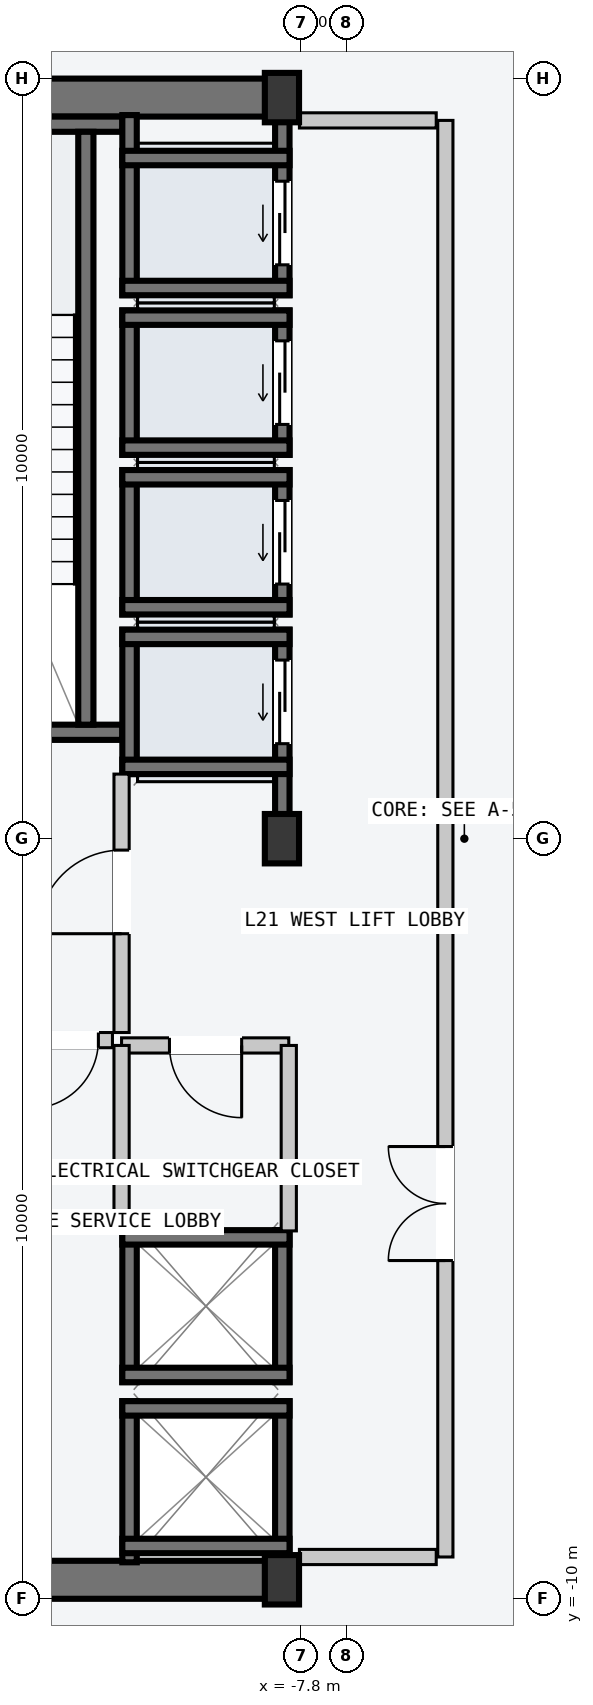
"""IFC4 building model, lengths in metres.
Left out: names, types, materials, properties, quantities, classifications, styles, units other than length and angle.
Written with IfcOpenShell. Run it as: python <this file> out.ifc"""

import sys

from ifc_helpers import new_model, si_unit, direction, frame, frame_2d, origin, origin_2d, place, context, subcontext, project, spatial, rectangle, i_section, extrude, element, fill, save


model = new_model("IFC4")
c1 = context("Model", 3, precision=1e-05, world=origin(), true_north=direction((0.0, 1.0)))
c2 = subcontext(c1, "Body", "Model", "MODEL_VIEW")
j1 = project(units=[si_unit("LENGTHUNIT", "METRE"), si_unit("PLANEANGLEUNIT", "RADIAN")], contexts=[c1])
p1 = place(None, origin())
s1 = spatial("IfcSite", under=j1, at=p1, CompositionType="ELEMENT")
p2 = place(p1, origin())
s2 = spatial("IfcBuilding", under=s1, at=p2, CompositionType="ELEMENT")
p3 = place(p2, frame((0.0, 0.0, 82.8)))
s3 = spatial("IfcBuildingStorey", under=s2, at=p3, CompositionType="ELEMENT", Elevation=82.8)
for number, where, z_axis, x_axis in (
    (1, (-14.53, -9.75, -0.2), (0.0, 0.0, 1.0), (1.0, 0.0, 0.0)),
    (2, (-14.53, 9.75, -0.2), (0.0, 0.0, 1.0), (1.0, 0.0, 0.0)),
):
    element("IfcWall", number, at=place(p3, frame(where, z_axis=z_axis, x_axis=x_axis)), inside=s3, PredefinedType="SHEAR", context=c2, shape_type="SweptSolid", body=[
        extrude(rectangle(XDim=6.46, YDim=0.5, at=frame_2d((3.23, 0.0))), origin(), (0.0, 0.0, 1.0), 4.5),
    ])
p4 = place(p3, frame((-14.25, 1.4, -0.2), z_axis=(0.0, 0.0, 1.0), x_axis=(1.0, 0.0, 0.0)))
e3 = element("IfcWall", 3, at=p4, inside=s3, PredefinedType="SOLIDWALL", context=c2, shape_type="SweptSolid", body=[
    extrude(rectangle(XDim=4.1, YDim=0.2, at=frame_2d((2.05, 0.0))), origin(), (0.0, 0.0, 1.0), 4.5),
])
p5 = place(p4, frame((1.5, 0.0, 0.2)))
e4 = element("IfcOpeningElement", 4, at=p5, cuts=e3, PredefinedType="OPENING", context=c2, shape_type="SweptSolid", body=[
    extrude(rectangle(XDim=1.12, YDim=2.18, at=frame_2d((0.56, 1.09))), frame((0.0, 0.11, 0.0), z_axis=(0.0, -1.0, 0.0), x_axis=(1.0, 0.0, 0.0)), (0.0, 0.0, 1.0), 0.22),
])
p6 = place(p3, frame((-14.25, 9.4, -0.2), z_axis=(0.0, 0.0, 1.0), x_axis=(1.0, 0.0, 0.0)))
e5 = element("IfcWall", 5, at=p6, inside=s3, PredefinedType="SOLIDWALL", context=c2, shape_type="SweptSolid", body=[
    extrude(rectangle(XDim=4.1, YDim=0.2, at=frame_2d((2.05, 0.0))), origin(), (0.0, 0.0, 1.0), 4.5),
])
p7 = place(p3, frame((-10.63, 1.5, -0.2), z_axis=(0.0, 0.0, 1.0), x_axis=(0.0, 1.0, 0.0)))
e6 = element("IfcWall", 6, at=p7, inside=s3, PredefinedType="SOLIDWALL", context=c2, shape_type="SweptSolid", body=[
    extrude(rectangle(XDim=7.8, YDim=0.2, at=frame_2d((3.9, 0.0))), origin(), (0.0, 0.0, 1.0), 4.5),
])
for number, where, z_axis, x_axis in (
    (7, (-8.05, -9.75, 0.0), (0.0, 0.0, 1.0), (1.0, 0.0, 0.0)),
    (8, (-8.05, 0.0, 0.0), (0.0, 0.0, 1.0), (1.0, 0.0, 0.0)),
    (9, (-8.05, 9.75, 0.0), (0.0, 0.0, 1.0), (1.0, 0.0, 0.0)),
):
    element("IfcColumn", number, at=place(p3, frame(where, z_axis=z_axis, x_axis=x_axis)), inside=s3, PredefinedType="COLUMN", context=c2, shape_type="SweptSolid", body=[
        extrude(i_section(OverallWidth=0.45, OverallDepth=0.65, WebThickness=0.025, FlangeThickness=0.04, at=origin_2d()), origin(), (0.0, 0.0, 1.0), 4.5),
    ])
p8 = place(p3, frame((-8.045, 0.21, -0.2), z_axis=(0.0, 0.0, 1.0), x_axis=(0.0, 1.0, 0.0)))
e10 = element("IfcWall", 10, at=p8, inside=s3, PredefinedType="SOLIDWALL", context=c2, shape_type="SweptSolid", body=[
    extrude(rectangle(XDim=2.54, YDim=0.19, at=frame_2d((1.27, 0.0))), origin(), (0.0, 0.0, 1.0), 4.5),
])
p9 = place(p8, frame((1.04, 0.0, 0.2)))
e11 = element("IfcOpeningElement", 11, at=p9, cuts=e10, PredefinedType="OPENING", context=c2, shape_type="SweptSolid", body=[
    extrude(rectangle(XDim=1.1, YDim=2.2, at=frame_2d((0.55, 1.1))), frame((0.0, 0.105, 0.0), z_axis=(0.0, -1.0, 0.0), x_axis=(1.0, 0.0, 0.0)), (0.0, 0.0, 1.0), 0.21),
])
p10 = place(p3, frame((-10.055, 0.85, -0.2), z_axis=(0.0, 0.0, 1.0), x_axis=(0.0, 1.0, 0.0)))
e12 = element("IfcWall", 12, at=p10, inside=s3, PredefinedType="SOLIDWALL", context=c2, shape_type="SweptSolid", body=[
    extrude(rectangle(XDim=1.9, YDim=0.19, at=frame_2d((0.95, 0.0))), origin(), (0.0, 0.0, 1.0), 4.5),
])
for number, where, z_axis, x_axis in (
    (13, (-10.15, 2.655, -0.2), (0.0, 0.0, 1.0), (1.0, 0.0, 0.0)),
    (14, (-10.15, 0.945, -0.2), (0.0, 0.0, 1.0), (1.0, 0.0, 0.0)),
):
    element("IfcWall", number, at=place(p3, frame(where, z_axis=z_axis, x_axis=x_axis)), inside=s3, PredefinedType="SOLIDWALL", context=c2, shape_type="SweptSolid", body=[
        extrude(rectangle(XDim=2.2, YDim=0.19, at=frame_2d((1.1, 0.0))), origin(), (0.0, 0.0, 1.0), 4.5),
    ])
p11 = place(p3, frame((-8.045, 2.95, -0.2), z_axis=(0.0, 0.0, 1.0), x_axis=(0.0, 1.0, 0.0)))
e15 = element("IfcWall", 15, at=p11, inside=s3, PredefinedType="SOLIDWALL", context=c2, shape_type="SweptSolid", body=[
    extrude(rectangle(XDim=1.9, YDim=0.19, at=frame_2d((0.95, 0.0))), origin(), (0.0, 0.0, 1.0), 4.5),
])
p12 = place(p11, frame((0.4, 0.0, 0.2)))
e16 = element("IfcOpeningElement", 16, at=p12, cuts=e15, PredefinedType="OPENING", context=c2, shape_type="SweptSolid", body=[
    extrude(rectangle(XDim=1.1, YDim=2.2, at=frame_2d((0.55, 1.1))), frame((0.0, 0.105, 0.0), z_axis=(0.0, -1.0, 0.0), x_axis=(1.0, 0.0, 0.0)), (0.0, 0.0, 1.0), 0.21),
])
p13 = place(p3, frame((-10.055, 2.95, -0.2), z_axis=(0.0, 0.0, 1.0), x_axis=(0.0, 1.0, 0.0)))
e17 = element("IfcWall", 17, at=p13, inside=s3, PredefinedType="SOLIDWALL", context=c2, shape_type="SweptSolid", body=[
    extrude(rectangle(XDim=1.9, YDim=0.19, at=frame_2d((0.95, 0.0))), origin(), (0.0, 0.0, 1.0), 4.5),
])
for number, where, z_axis, x_axis in (
    (18, (-10.15, 4.755, -0.2), (0.0, 0.0, 1.0), (1.0, 0.0, 0.0)),
    (19, (-10.15, 3.045, -0.2), (0.0, 0.0, 1.0), (1.0, 0.0, 0.0)),
):
    element("IfcWall", number, at=place(p3, frame(where, z_axis=z_axis, x_axis=x_axis)), inside=s3, PredefinedType="SOLIDWALL", context=c2, shape_type="SweptSolid", body=[
        extrude(rectangle(XDim=2.2, YDim=0.19, at=frame_2d((1.1, 0.0))), origin(), (0.0, 0.0, 1.0), 4.5),
    ])
p14 = place(p3, frame((-8.045, 5.05, -0.2), z_axis=(0.0, 0.0, 1.0), x_axis=(0.0, 1.0, 0.0)))
e20 = element("IfcWall", 20, at=p14, inside=s3, PredefinedType="SOLIDWALL", context=c2, shape_type="SweptSolid", body=[
    extrude(rectangle(XDim=1.9, YDim=0.19, at=frame_2d((0.95, 0.0))), origin(), (0.0, 0.0, 1.0), 4.5),
])
p15 = place(p14, frame((0.4, 0.0, 0.2)))
e21 = element("IfcOpeningElement", 21, at=p15, cuts=e20, PredefinedType="OPENING", context=c2, shape_type="SweptSolid", body=[
    extrude(rectangle(XDim=1.1, YDim=2.2, at=frame_2d((0.55, 1.1))), frame((0.0, 0.105, 0.0), z_axis=(0.0, -1.0, 0.0), x_axis=(1.0, 0.0, 0.0)), (0.0, 0.0, 1.0), 0.21),
])
p16 = place(p3, frame((-10.055, 5.05, -0.2), z_axis=(0.0, 0.0, 1.0), x_axis=(0.0, 1.0, 0.0)))
e22 = element("IfcWall", 22, at=p16, inside=s3, PredefinedType="SOLIDWALL", context=c2, shape_type="SweptSolid", body=[
    extrude(rectangle(XDim=1.9, YDim=0.19, at=frame_2d((0.95, 0.0))), origin(), (0.0, 0.0, 1.0), 4.5),
])
for number, where, z_axis, x_axis in (
    (23, (-10.15, 6.855, -0.2), (0.0, 0.0, 1.0), (1.0, 0.0, 0.0)),
    (24, (-10.15, 5.145, -0.2), (0.0, 0.0, 1.0), (1.0, 0.0, 0.0)),
):
    element("IfcWall", number, at=place(p3, frame(where, z_axis=z_axis, x_axis=x_axis)), inside=s3, PredefinedType="SOLIDWALL", context=c2, shape_type="SweptSolid", body=[
        extrude(rectangle(XDim=2.2, YDim=0.19, at=frame_2d((1.1, 0.0))), origin(), (0.0, 0.0, 1.0), 4.5),
    ])
p17 = place(p3, frame((-8.045, 7.15, -0.2), z_axis=(0.0, 0.0, 1.0), x_axis=(0.0, 1.0, 0.0)))
e25 = element("IfcWall", 25, at=p17, inside=s3, PredefinedType="SOLIDWALL", context=c2, shape_type="SweptSolid", body=[
    extrude(rectangle(XDim=2.37, YDim=0.19, at=frame_2d((1.185, 0.0))), origin(), (0.0, 0.0, 1.0), 4.5),
])
p18 = place(p17, frame((0.4, 0.0, 0.2)))
e26 = element("IfcOpeningElement", 26, at=p18, cuts=e25, PredefinedType="OPENING", context=c2, shape_type="SweptSolid", body=[
    extrude(rectangle(XDim=1.1, YDim=2.2, at=frame_2d((0.55, 1.1))), frame((0.0, 0.105, 0.0), z_axis=(0.0, -1.0, 0.0), x_axis=(1.0, 0.0, 0.0)), (0.0, 0.0, 1.0), 0.21),
])
p19 = place(p3, frame((-10.055, 7.15, -0.2), z_axis=(0.0, 0.0, 1.0), x_axis=(0.0, 1.0, 0.0)))
e27 = element("IfcWall", 27, at=p19, inside=s3, PredefinedType="SOLIDWALL", context=c2, shape_type="SweptSolid", body=[
    extrude(rectangle(XDim=2.37, YDim=0.19, at=frame_2d((1.185, 0.0))), origin(), (0.0, 0.0, 1.0), 4.5),
])
for number, where, z_axis, x_axis in (
    (28, (-10.15, 8.955, -0.2), (0.0, 0.0, 1.0), (1.0, 0.0, 0.0)),
    (29, (-10.15, 7.245, -0.2), (0.0, 0.0, 1.0), (1.0, 0.0, 0.0)),
):
    element("IfcWall", number, at=place(p3, frame(where, z_axis=z_axis, x_axis=x_axis)), inside=s3, PredefinedType="SOLIDWALL", context=c2, shape_type="SweptSolid", body=[
        extrude(rectangle(XDim=2.2, YDim=0.19, at=frame_2d((1.1, 0.0))), origin(), (0.0, 0.0, 1.0), 4.5),
    ])
for number, where, z_axis, x_axis in (
    (30, (-8.045, -9.52, -0.2), (0.0, 0.0, 1.0), (0.0, 1.0, 0.0)),
    (31, (-10.055, -9.52, -0.2), (0.0, 0.0, 1.0), (0.0, 1.0, 0.0)),
):
    element("IfcWall", number, at=place(p3, frame(where, z_axis=z_axis, x_axis=x_axis)), inside=s3, PredefinedType="SOLIDWALL", context=c2, shape_type="SweptSolid", body=[
        extrude(rectangle(XDim=2.12, YDim=0.19, at=frame_2d((1.06, 0.0))), origin(), (0.0, 0.0, 1.0), 4.5),
    ])
for number, where, z_axis, x_axis in (
    (32, (-10.15, -7.495, -0.2), (0.0, 0.0, 1.0), (1.0, 0.0, 0.0)),
    (33, (-10.15, -9.305, -0.2), (0.0, 0.0, 1.0), (1.0, 0.0, 0.0)),
):
    element("IfcWall", number, at=place(p3, frame(where, z_axis=z_axis, x_axis=x_axis)), inside=s3, PredefinedType="SOLIDWALL", context=c2, shape_type="SweptSolid", body=[
        extrude(rectangle(XDim=2.2, YDim=0.19, at=frame_2d((1.1, 0.0))), origin(), (0.0, 0.0, 1.0), 4.5),
    ])
for number, where, z_axis, x_axis in (
    (34, (-8.045, -7.15, -0.2), (0.0, 0.0, 1.0), (0.0, 1.0, 0.0)),
    (35, (-10.055, -7.15, -0.2), (0.0, 0.0, 1.0), (0.0, 1.0, 0.0)),
):
    element("IfcWall", number, at=place(p3, frame(where, z_axis=z_axis, x_axis=x_axis)), inside=s3, PredefinedType="SOLIDWALL", context=c2, shape_type="SweptSolid", body=[
        extrude(rectangle(XDim=2.0, YDim=0.19, at=frame_2d((1.0, 0.0))), origin(), (0.0, 0.0, 1.0), 4.5),
    ])
for number, where, z_axis, x_axis in (
    (36, (-10.15, -5.245, -0.2), (0.0, 0.0, 1.0), (1.0, 0.0, 0.0)),
    (37, (-10.15, -7.055, -0.2), (0.0, 0.0, 1.0), (1.0, 0.0, 0.0)),
):
    element("IfcWall", number, at=place(p3, frame(where, z_axis=z_axis, x_axis=x_axis)), inside=s3, PredefinedType="SOLIDWALL", context=c2, shape_type="SweptSolid", body=[
        extrude(rectangle(XDim=2.2, YDim=0.19, at=frame_2d((1.1, 0.0))), origin(), (0.0, 0.0, 1.0), 4.5),
    ])
p20 = place(p3, frame((-5.9, -9.45, 0.0), z_axis=(0.0, 0.0, 1.0), x_axis=(0.0, 1.0, 0.0)))
e38 = element("IfcWall", 38, at=p20, inside=s3, PredefinedType="PARTITIONING", context=c2, shape_type="SweptSolid", body=[
    extrude(rectangle(XDim=18.9, YDim=0.2, at=frame_2d((9.45, 0.0))), origin(), (0.0, 0.0, 1.0), 4.3),
])
p21 = place(p20, frame((3.9, 0.0, 0.0)))
e39 = element("IfcOpeningElement", 39, at=p21, cuts=e38, PredefinedType="OPENING", context=c2, shape_type="SweptSolid", body=[
    extrude(rectangle(XDim=1.5, YDim=2.2, at=frame_2d((0.75, 1.1))), frame((0.0, 0.11, 0.0), z_axis=(0.0, -1.0, 0.0), x_axis=(1.0, 0.0, 0.0)), (0.0, 0.0, 1.0), 0.22),
])
for number, where, z_axis, x_axis in (
    (40, (-6.02, -9.45, 0.0), (0.0, 0.0, 1.0), (-1.0, 0.0, 0.0)),
    (41, (-6.02, 9.45, 0.0), (0.0, 0.0, 1.0), (-1.0, 0.0, 0.0)),
):
    element("IfcWall", number, at=place(p3, frame(where, z_axis=z_axis, x_axis=x_axis)), inside=s3, PredefinedType="PARTITIONING", context=c2, shape_type="SweptSolid", body=[
        extrude(rectangle(XDim=1.8, YDim=0.2, at=frame_2d((0.9, 0.0))), origin(), (0.0, 0.0, 1.0), 2.64),
    ])
p22 = place(p3, frame((-10.16, -2.55, 0.0), z_axis=(0.0, 0.0, 1.0), x_axis=(0.0, 1.0, 0.0)))
e42 = element("IfcWall", 42, at=p22, inside=s3, PredefinedType="PARTITIONING", context=c2, shape_type="SweptSolid", body=[
    extrude(rectangle(XDim=3.4, YDim=0.2, at=frame_2d((1.7, 0.0))), origin(), (0.0, 0.0, 1.0), 4.3),
])
p23 = place(p22, frame((1.3, 0.0, 0.0)))
e43 = element("IfcOpeningElement", 43, at=p23, cuts=e42, PredefinedType="OPENING", context=c2, shape_type="SweptSolid", body=[
    extrude(rectangle(XDim=1.1, YDim=2.15, at=frame_2d((0.55, 1.075))), frame((0.0, 0.11, 0.0), z_axis=(0.0, -1.0, 0.0), x_axis=(1.0, 0.0, 0.0)), (0.0, 0.0, 1.0), 0.22),
])
p24 = place(p3, frame((-10.28, -2.65, 0.0), z_axis=(0.0, 0.0, 1.0), x_axis=(-1.0, 0.0, 0.0)))
e44 = element("IfcWall", 44, at=p24, inside=s3, PredefinedType="PARTITIONING", context=c2, shape_type="SweptSolid", body=[
    extrude(rectangle(XDim=1.27, YDim=0.2, at=frame_2d((0.635, 0.0))), origin(), (0.0, 0.0, 1.0), 4.3),
])
p25 = place(p24, frame((0.185, 0.0, 0.0)))
e45 = element("IfcOpeningElement", 45, at=p25, cuts=e44, PredefinedType="OPENING", context=c2, shape_type="SweptSolid", body=[
    extrude(rectangle(XDim=0.9, YDim=2.15, at=frame_2d((0.45, 1.075))), frame((0.0, 0.11, 0.0), z_axis=(0.0, -1.0, 0.0), x_axis=(1.0, 0.0, 0.0)), (0.0, 0.0, 1.0), 0.22),
])
p26 = place(p3, frame((-7.96, -2.72, 0.0), z_axis=(0.0, 0.0, 1.0), x_axis=(-1.0, 0.0, 0.0)))
e46 = element("IfcWall", 46, at=p26, inside=s3, PredefinedType="PARTITIONING", context=c2, shape_type="SweptSolid", body=[
    extrude(rectangle(XDim=2.2, YDim=0.2, at=frame_2d((1.1, 0.0))), origin(), (0.0, 0.0, 1.0), 4.3),
])
p27 = place(p26, frame((0.62, 0.0, 0.0)))
e47 = element("IfcOpeningElement", 47, at=p27, cuts=e46, PredefinedType="OPENING", context=c2, shape_type="SweptSolid", body=[
    extrude(rectangle(XDim=0.95, YDim=2.1, at=frame_2d((0.475, 1.05))), frame((0.0, 0.11, 0.0), z_axis=(0.0, -1.0, 0.0), x_axis=(1.0, 0.0, 0.0)), (0.0, 0.0, 1.0), 0.22),
])
for number, where, z_axis, x_axis in (
    (48, (-7.96, -5.16, 0.0), (0.0, 0.0, 1.0), (0.0, 1.0, 0.0)),
    (49, (-10.16, -5.16, 0.0), (0.0, 0.0, 1.0), (0.0, 1.0, 0.0)),
):
    element("IfcWall", number, at=place(p3, frame(where, z_axis=z_axis, x_axis=x_axis)), inside=s3, PredefinedType="PARTITIONING", context=c2, shape_type="SweptSolid", body=[
        extrude(rectangle(XDim=2.44, YDim=0.2, at=frame_2d((1.22, 0.0))), origin(), (0.0, 0.0, 1.0), 4.3),
    ])
p28 = place(p9, origin())
e50 = element("IfcDoor", 50, at=p28, inside=s3, OperationType="SLIDING_TO_LEFT", PredefinedType="DOOR", context=c2, shape_type="SweptSolid", body=[
    extrude(rectangle(XDim=1.1, YDim=2.2, at=frame_2d((0.55, 1.1))), frame((0.0, 0.025, 0.0), z_axis=(0.0, -1.0, 0.0), x_axis=(1.0, 0.0, 0.0)), (0.0, 0.0, 1.0), 0.05),
])
fill(e11, e50)
p29 = place(p12, origin())
e51 = element("IfcDoor", 51, at=p29, inside=s3, OperationType="SLIDING_TO_LEFT", PredefinedType="DOOR", context=c2, shape_type="SweptSolid", body=[
    extrude(rectangle(XDim=1.1, YDim=2.2, at=frame_2d((0.55, 1.1))), frame((0.0, 0.025, 0.0), z_axis=(0.0, -1.0, 0.0), x_axis=(1.0, 0.0, 0.0)), (0.0, 0.0, 1.0), 0.05),
])
fill(e16, e51)
p30 = place(p15, origin())
e52 = element("IfcDoor", 52, at=p30, inside=s3, OperationType="SLIDING_TO_LEFT", PredefinedType="DOOR", context=c2, shape_type="SweptSolid", body=[
    extrude(rectangle(XDim=1.1, YDim=2.2, at=frame_2d((0.55, 1.1))), frame((0.0, 0.025, 0.0), z_axis=(0.0, -1.0, 0.0), x_axis=(1.0, 0.0, 0.0)), (0.0, 0.0, 1.0), 0.05),
])
fill(e21, e52)
p31 = place(p18, origin())
e53 = element("IfcDoor", 53, at=p31, inside=s3, OperationType="SLIDING_TO_LEFT", PredefinedType="DOOR", context=c2, shape_type="SweptSolid", body=[
    extrude(rectangle(XDim=1.1, YDim=2.2, at=frame_2d((0.55, 1.1))), frame((0.0, 0.025, 0.0), z_axis=(0.0, -1.0, 0.0), x_axis=(1.0, 0.0, 0.0)), (0.0, 0.0, 1.0), 0.05),
])
fill(e26, e53)
p32 = place(p21, origin())
e54 = element("IfcDoor", 54, at=p32, inside=s3, OperationType="DOUBLE_DOOR_SINGLE_SWING", PredefinedType="DOOR", context=c2, shape_type="SweptSolid", body=[
    extrude(rectangle(XDim=1.5, YDim=2.2, at=frame_2d((0.75, 1.1))), frame((0.0, 0.025, 0.0), z_axis=(0.0, -1.0, 0.0), x_axis=(1.0, 0.0, 0.0)), (0.0, 0.0, 1.0), 0.05),
])
fill(e39, e54)
p33 = place(p23, origin())
e55 = element("IfcDoor", 55, at=p33, inside=s3, OperationType="SINGLE_SWING_LEFT", PredefinedType="DOOR", context=c2, shape_type="SweptSolid", body=[
    extrude(rectangle(XDim=1.1, YDim=2.15, at=frame_2d((0.55, 1.075))), frame((0.0, 0.025, 0.0), z_axis=(0.0, -1.0, 0.0), x_axis=(1.0, 0.0, 0.0)), (0.0, 0.0, 1.0), 0.05),
])
fill(e43, e55)
p34 = place(p25, origin())
e56 = element("IfcDoor", 56, at=p34, inside=s3, OperationType="SINGLE_SWING_RIGHT", PredefinedType="DOOR", context=c2, shape_type="SweptSolid", body=[
    extrude(rectangle(XDim=0.9, YDim=2.15, at=frame_2d((0.45, 1.075))), frame((0.0, 0.025, 0.0), z_axis=(0.0, -1.0, 0.0), x_axis=(1.0, 0.0, 0.0)), (0.0, 0.0, 1.0), 0.05),
])
fill(e45, e56)
p35 = place(p27, origin())
e57 = element("IfcDoor", 57, at=p35, inside=s3, OperationType="SINGLE_SWING_LEFT", PredefinedType="DOOR", context=c2, shape_type="SweptSolid", body=[
    extrude(rectangle(XDim=0.95, YDim=2.1, at=frame_2d((0.475, 1.05))), frame((0.0, 0.025, 0.0), z_axis=(0.0, -1.0, 0.0), x_axis=(1.0, 0.0, 0.0)), (0.0, 0.0, 1.0), 0.05),
])
fill(e47, e57)
save(model, sys.argv[1])
